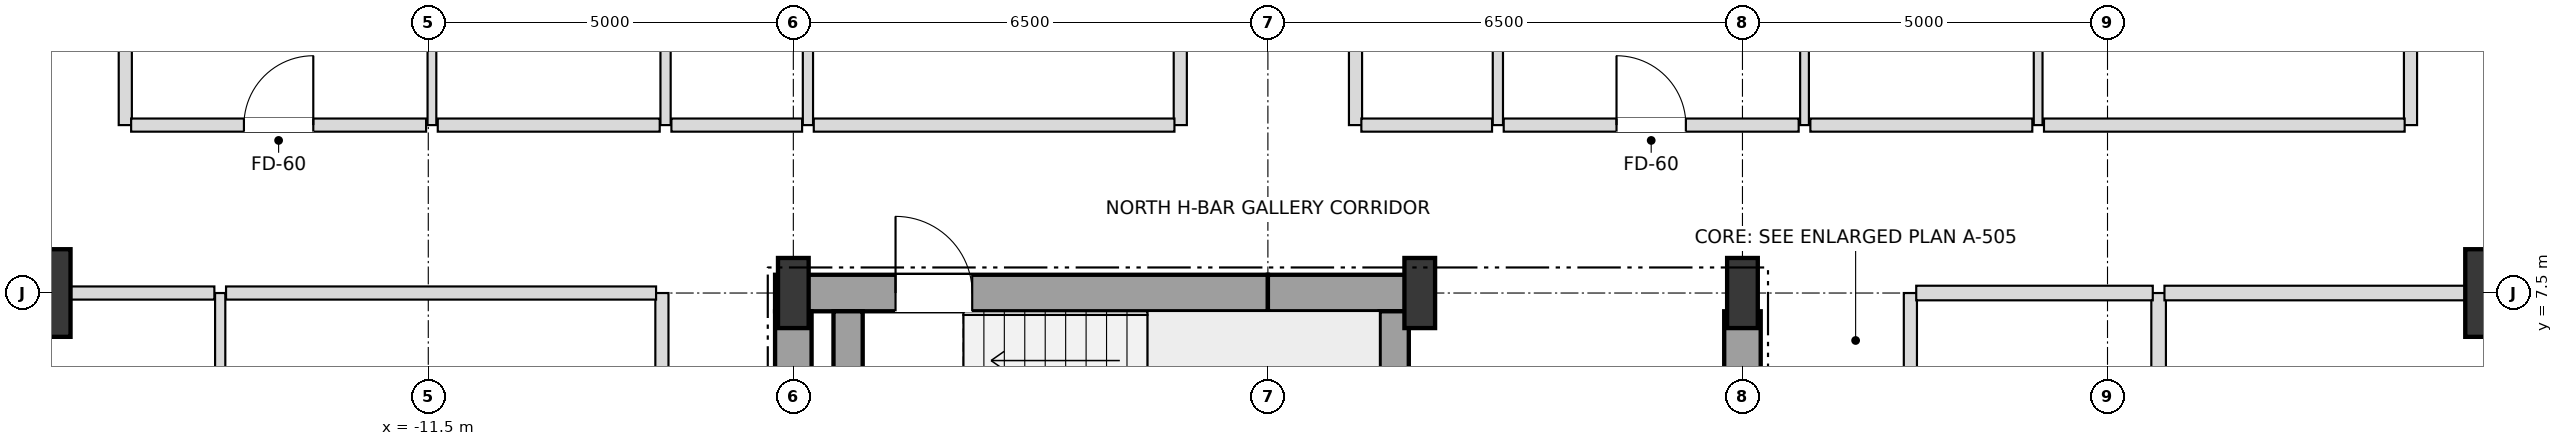
"""IFC4 building model, lengths in metres.
Left out: names, types, materials, properties, quantities, classifications, styles, units other than length and angle.
Written with IfcOpenShell. Run it as: python <this file> out.ifc"""

import sys

from ifc_helpers import new_model, si_unit, direction, frame, frame_2d, origin, origin_2d, place, context, subcontext, project, spatial, rectangle, i_section, extrude, element, fill, save


model = new_model("IFC4")
c1 = context("Model", 3, precision=1e-05, world=origin(), true_north=direction((0.0, 1.0)))
c2 = subcontext(c1, "Body", "Model", "MODEL_VIEW")
j1 = project(units=[si_unit("LENGTHUNIT", "METRE"), si_unit("PLANEANGLEUNIT", "RADIAN")], contexts=[c1])
p1 = place(None, origin())
s1 = spatial("IfcSite", under=j1, at=p1, CompositionType="ELEMENT")
p2 = place(p1, origin())
s2 = spatial("IfcBuilding", under=s1, at=p2, CompositionType="ELEMENT")
p3 = place(p2, frame((0.0, 0.0, 129.6)))
s3 = spatial("IfcBuildingStorey", under=s2, at=p3, CompositionType="ELEMENT", Elevation=129.6)
for number, where, z_axis, x_axis in (
    (1, (-6.5, 7.5, 0.0), (0.0, 0.0, 1.0), (1.0, 0.0, 0.0)),
    (2, (2.08, 7.5, 0.0), (0.0, 0.0, 1.0), (1.0, 0.0, 0.0)),
    (3, (6.5, 7.5, 0.0), (0.0, 0.0, 1.0), (1.0, 0.0, 0.0)),
):
    element("IfcColumn", number, at=place(p3, frame(where, z_axis=z_axis, x_axis=x_axis)), inside=s3, PredefinedType="COLUMN", context=c2, shape_type="SweptSolid", body=[
        extrude(i_section(OverallWidth=0.42, OverallDepth=0.96, WebThickness=0.022, FlangeThickness=0.034, at=origin_2d()), origin(), (0.0, 0.0, 1.0), 3.6),
    ])
for number, where, z_axis, x_axis in (
    (4, (17.0, 7.5, 0.0), (0.0, 0.0, 1.0), (1.0, 0.0, 0.0)),
    (5, (-17.0, 7.5, 0.0), (0.0, 0.0, 1.0), (1.0, 0.0, 0.0)),
):
    element("IfcColumn", number, at=place(p3, frame(where, z_axis=z_axis, x_axis=x_axis)), inside=s3, PredefinedType="USERDEFINED", context=c2, shape_type="SweptSolid", body=[
        extrude(rectangle(XDim=1.2, YDim=1.2, at=origin_2d()), origin(), (0.0, 0.0, 1.0), 3.6),
    ])
p4 = place(p3, frame((-6.75, 7.5, 0.0), z_axis=(0.0, 0.0, 1.0), x_axis=(1.0, 0.0, 0.0)))
e6 = element("IfcWall", 6, at=p4, inside=s3, PredefinedType="SHEAR", context=c2, shape_type="SweptSolid", body=[
    extrude(rectangle(XDim=6.75, YDim=0.5, at=frame_2d((3.375, 0.0))), origin(), (0.0, 0.0, 1.0), 3.38),
])
p5 = place(p4, frame((1.65, 0.0, 0.0)))
e7 = element("IfcOpeningElement", 7, at=p5, cuts=e6, PredefinedType="OPENING", context=c2, shape_type="SweptSolid", body=[
    extrude(rectangle(XDim=1.05, YDim=2.15, at=frame_2d((0.525, 1.075))), frame((0.0, 0.26, 0.0), z_axis=(0.0, -1.0, 0.0), x_axis=(1.0, 0.0, 0.0)), (0.0, 0.0, 1.0), 0.52),
])
p6 = place(p3, frame((0.0, 7.5, 0.0), z_axis=(0.0, 0.0, 1.0), x_axis=(1.0, 0.0, 0.0)))
e8 = element("IfcWall", 8, at=p6, inside=s3, PredefinedType="SHEAR", context=c2, shape_type="SweptSolid", body=[
    extrude(rectangle(XDim=2.08, YDim=0.5, at=frame_2d((1.04, 0.0))), origin(), (0.0, 0.0, 1.0), 3.38),
])
for number, where, z_axis, x_axis in (
    (9, (-6.5, 3.95, 0.0), (0.0, 0.0, 1.0), (0.0, 1.0, 0.0)),
    (10, (6.5, 3.95, 0.0), (0.0, 0.0, 1.0), (0.0, 1.0, 0.0)),
):
    element("IfcWall", number, at=place(p3, frame(where, z_axis=z_axis, x_axis=x_axis)), inside=s3, PredefinedType="SHEAR", context=c2, shape_type="SweptSolid", body=[
        extrude(rectangle(XDim=3.3, YDim=0.5, at=frame_2d((1.65, 0.0))), origin(), (0.0, 0.0, 1.0), 3.38),
    ])
for number, where, z_axis, x_axis in (
    (11, (1.73, 3.95, 0.0), (0.0, 0.0, 1.0), (0.0, 1.0, 0.0)),
    (12, (-5.75, 3.95, 0.0), (0.0, 0.0, 1.0), (0.0, 1.0, 0.0)),
):
    element("IfcWall", number, at=place(p3, frame(where, z_axis=z_axis, x_axis=x_axis)), inside=s3, PredefinedType="SHEAR", context=c2, shape_type="SweptSolid", body=[
        extrude(rectangle(XDim=3.3, YDim=0.4, at=frame_2d((1.65, 0.0))), origin(), (0.0, 0.0, 1.0), 3.38),
    ])
p7 = place(p3, frame((-15.65, 9.8, 0.0), z_axis=(0.0, 0.0, 1.0), x_axis=(0.0, 1.0, 0.0)))
e13 = element("IfcWall", 13, at=p7, inside=s3, PredefinedType="PARTITIONING", context=c2, shape_type="SweptSolid", body=[
    extrude(rectangle(XDim=7.35, YDim=0.18, at=frame_2d((3.675, 0.0))), origin(), (0.0, 0.0, 1.0), 2.736),
])
p8 = place(p3, frame((-14.35, -7.5, 0.0), z_axis=(0.0, 0.0, 1.0), x_axis=(0.0, 1.0, 0.0)))
e14 = element("IfcWall", 14, at=p8, inside=s3, PredefinedType="PARTITIONING", context=c2, shape_type="SweptSolid", body=[
    extrude(rectangle(XDim=15.0, YDim=0.14, at=frame_2d((7.5, 0.0))), origin(), (0.0, 0.0, 1.0), 3.38),
])
p9 = place(p8, frame((3.475, 0.0, 0.0)))
e15 = element("IfcOpeningElement", 15, at=p9, cuts=e14, PredefinedType="OPENING", context=c2, shape_type="SweptSolid", body=[
    extrude(rectangle(XDim=0.95, YDim=2.1, at=frame_2d((0.475, 1.05))), frame((0.0, 0.08, 0.0), z_axis=(0.0, -1.0, 0.0), x_axis=(1.0, 0.0, 0.0)), (0.0, 0.0, 1.0), 0.16),
])
p10 = place(p3, frame((-11.45, 9.8, 0.0), z_axis=(0.0, 0.0, 1.0), x_axis=(0.0, 1.0, 0.0)))
e16 = element("IfcWall", 16, at=p10, inside=s3, PredefinedType="PARTITIONING", context=c2, shape_type="SweptSolid", body=[
    extrude(rectangle(XDim=7.35, YDim=0.12, at=frame_2d((3.675, 0.0))), origin(), (0.0, 0.0, 1.0), 2.736),
])
p11 = place(p10, frame((3.713, 0.0, 0.0)))
e17 = element("IfcOpeningElement", 17, at=p11, cuts=e16, PredefinedType="OPENING", context=c2, shape_type="SweptSolid", body=[
    extrude(rectangle(XDim=0.95, YDim=2.1, at=frame_2d((0.475, 1.05))), frame((0.0, 0.07, 0.0), z_axis=(0.0, -1.0, 0.0), x_axis=(1.0, 0.0, 0.0)), (0.0, 0.0, 1.0), 0.14),
])
p12 = place(p3, frame((-8.3, -7.5, 0.0), z_axis=(0.0, 0.0, 1.0), x_axis=(0.0, 1.0, 0.0)))
e18 = element("IfcWall", 18, at=p12, inside=s3, PredefinedType="PARTITIONING", context=c2, shape_type="SweptSolid", body=[
    extrude(rectangle(XDim=15.0, YDim=0.18, at=frame_2d((7.5, 0.0))), origin(), (0.0, 0.0, 1.0), 3.38),
])
p13 = place(p12, frame((2.495, 0.0, 0.0)))
e19 = element("IfcOpeningElement", 19, at=p13, cuts=e18, PredefinedType="OPENING", context=c2, shape_type="SweptSolid", body=[
    extrude(rectangle(XDim=0.95, YDim=2.15, at=frame_2d((0.475, 1.075))), frame((0.0, 0.1, 0.0), z_axis=(0.0, -1.0, 0.0), x_axis=(1.0, 0.0, 0.0)), (0.0, 0.0, 1.0), 0.2),
])
p14 = place(p3, frame((-8.25, 9.8, 0.0), z_axis=(0.0, 0.0, 1.0), x_axis=(0.0, 1.0, 0.0)))
e20 = element("IfcWall", 20, at=p14, inside=s3, PredefinedType="PARTITIONING", context=c2, shape_type="SweptSolid", body=[
    extrude(rectangle(XDim=7.35, YDim=0.14, at=frame_2d((3.675, 0.0))), origin(), (0.0, 0.0, 1.0), 2.816),
])
p15 = place(p14, frame((3.22, 0.0, 0.0)))
e21 = element("IfcOpeningElement", 21, at=p15, cuts=e20, PredefinedType="OPENING", context=c2, shape_type="SweptSolid", body=[
    extrude(rectangle(XDim=0.9, YDim=2.1, at=frame_2d((0.45, 1.05))), frame((0.0, 0.08, 0.0), z_axis=(0.0, -1.0, 0.0), x_axis=(1.0, 0.0, 0.0)), (0.0, 0.0, 1.0), 0.16),
])
p16 = place(p3, frame((-6.3, 9.8, 0.0), z_axis=(0.0, 0.0, 1.0), x_axis=(0.0, 1.0, 0.0)))
e22 = element("IfcWall", 22, at=p16, inside=s3, PredefinedType="PARTITIONING", context=c2, shape_type="SweptSolid", body=[
    extrude(rectangle(XDim=13.35, YDim=0.14, at=frame_2d((6.675, 0.0))), origin(), (0.0, 0.0, 1.0), 2.816),
])
p17 = place(p16, frame((11.051, 0.0, 0.0)))
e23 = element("IfcOpeningElement", 23, at=p17, cuts=e22, PredefinedType="OPENING", context=c2, shape_type="SweptSolid", body=[
    extrude(rectangle(XDim=0.9, YDim=2.1, at=frame_2d((0.45, 1.05))), frame((0.0, 0.08, 0.0), z_axis=(0.0, -1.0, 0.0), x_axis=(1.0, 0.0, 0.0)), (0.0, 0.0, 1.0), 0.16),
])
for number, where, z_axis, x_axis in (
    (24, (-1.2, 9.8, 0.0), (0.0, 0.0, 1.0), (0.0, 1.0, 0.0)),
    (25, (1.2, 9.8, 0.0), (0.0, 0.0, 1.0), (0.0, 1.0, 0.0)),
):
    element("IfcWall", number, at=place(p3, frame(where, z_axis=z_axis, x_axis=x_axis)), inside=s3, PredefinedType="PARTITIONING", context=c2, shape_type="SweptSolid", body=[
        extrude(rectangle(XDim=13.35, YDim=0.18, at=frame_2d((6.675, 0.0))), origin(), (0.0, 0.0, 1.0), 2.816),
    ])
p18 = place(p3, frame((3.15, 9.8, 0.0), z_axis=(0.0, 0.0, 1.0), x_axis=(0.0, 1.0, 0.0)))
e26 = element("IfcWall", 26, at=p18, inside=s3, PredefinedType="PARTITIONING", context=c2, shape_type="SweptSolid", body=[
    extrude(rectangle(XDim=7.35, YDim=0.14, at=frame_2d((3.675, 0.0))), origin(), (0.0, 0.0, 1.0), 3.38),
])
p19 = place(p18, frame((3.22, 0.0, 0.0)))
e27 = element("IfcOpeningElement", 27, at=p19, cuts=e26, PredefinedType="OPENING", context=c2, shape_type="SweptSolid", body=[
    extrude(rectangle(XDim=0.9, YDim=2.1, at=frame_2d((0.45, 1.05))), frame((0.0, 0.08, 0.0), z_axis=(0.0, -1.0, 0.0), x_axis=(1.0, 0.0, 0.0)), (0.0, 0.0, 1.0), 0.16),
])
p20 = place(p3, frame((7.35, 9.8, 0.0), z_axis=(0.0, 0.0, 1.0), x_axis=(0.0, 1.0, 0.0)))
e28 = element("IfcWall", 28, at=p20, inside=s3, PredefinedType="PARTITIONING", context=c2, shape_type="SweptSolid", body=[
    extrude(rectangle(XDim=13.35, YDim=0.12, at=frame_2d((6.675, 0.0))), origin(), (0.0, 0.0, 1.0), 2.816),
])
p21 = place(p20, frame((3.195, 0.0, 0.0)))
e29 = element("IfcOpeningElement", 29, at=p21, cuts=e28, PredefinedType="OPENING", context=c2, shape_type="SweptSolid", body=[
    extrude(rectangle(XDim=0.95, YDim=2.1, at=frame_2d((0.475, 1.05))), frame((0.0, 0.07, 0.0), z_axis=(0.0, -1.0, 0.0), x_axis=(1.0, 0.0, 0.0)), (0.0, 0.0, 1.0), 0.14),
])
p22 = place(p20, frame((11.051, 0.0, 0.0)))
e30 = element("IfcOpeningElement", 30, at=p22, cuts=e28, PredefinedType="OPENING", context=c2, shape_type="SweptSolid", body=[
    extrude(rectangle(XDim=0.9, YDim=2.1, at=frame_2d((0.45, 1.05))), frame((0.0, 0.07, 0.0), z_axis=(0.0, -1.0, 0.0), x_axis=(1.0, 0.0, 0.0)), (0.0, 0.0, 1.0), 0.14),
])
p23 = place(p3, frame((8.8, -7.5, 0.0), z_axis=(0.0, 0.0, 1.0), x_axis=(0.0, 1.0, 0.0)))
e31 = element("IfcWall", 31, at=p23, inside=s3, PredefinedType="PARTITIONING", context=c2, shape_type="SweptSolid", body=[
    extrude(rectangle(XDim=15.0, YDim=0.18, at=frame_2d((7.5, 0.0))), origin(), (0.0, 0.0, 1.0), 3.38),
])
p24 = place(p23, frame((2.425, 0.0, 0.0)))
e32 = element("IfcOpeningElement", 32, at=p24, cuts=e31, PredefinedType="OPENING", context=c2, shape_type="SweptSolid", body=[
    extrude(rectangle(XDim=0.95, YDim=2.15, at=frame_2d((0.475, 1.075))), frame((0.0, 0.1, 0.0), z_axis=(0.0, -1.0, 0.0), x_axis=(1.0, 0.0, 0.0)), (0.0, 0.0, 1.0), 0.2),
])
p25 = place(p23, frame((7.525, 0.0, 0.0)))
e33 = element("IfcOpeningElement", 33, at=p25, cuts=e31, PredefinedType="OPENING", context=c2, shape_type="SweptSolid", body=[
    extrude(rectangle(XDim=0.95, YDim=2.15, at=frame_2d((0.475, 1.075))), frame((0.0, 0.1, 0.0), z_axis=(0.0, -1.0, 0.0), x_axis=(1.0, 0.0, 0.0)), (0.0, 0.0, 1.0), 0.2),
])
p26 = place(p23, frame((12.225, 0.0, 0.0)))
e34 = element("IfcOpeningElement", 34, at=p26, cuts=e31, PredefinedType="OPENING", context=c2, shape_type="SweptSolid", body=[
    extrude(rectangle(XDim=0.95, YDim=2.15, at=frame_2d((0.475, 1.075))), frame((0.0, 0.1, 0.0), z_axis=(0.0, -1.0, 0.0), x_axis=(1.0, 0.0, 0.0)), (0.0, 0.0, 1.0), 0.2),
])
p27 = place(p3, frame((10.55, 9.8, 0.0), z_axis=(0.0, 0.0, 1.0), x_axis=(0.0, 1.0, 0.0)))
e35 = element("IfcWall", 35, at=p27, inside=s3, PredefinedType="PARTITIONING", context=c2, shape_type="SweptSolid", body=[
    extrude(rectangle(XDim=13.35, YDim=0.12, at=frame_2d((6.675, 0.0))), origin(), (0.0, 0.0, 1.0), 2.816),
])
p28 = place(p27, frame((3.713, 0.0, 0.0)))
e36 = element("IfcOpeningElement", 36, at=p28, cuts=e35, PredefinedType="OPENING", context=c2, shape_type="SweptSolid", body=[
    extrude(rectangle(XDim=0.95, YDim=2.1, at=frame_2d((0.475, 1.05))), frame((0.0, 0.07, 0.0), z_axis=(0.0, -1.0, 0.0), x_axis=(1.0, 0.0, 0.0)), (0.0, 0.0, 1.0), 0.14),
])
p29 = place(p27, frame((11.051, 0.0, 0.0)))
e37 = element("IfcOpeningElement", 37, at=p29, cuts=e35, PredefinedType="OPENING", context=c2, shape_type="SweptSolid", body=[
    extrude(rectangle(XDim=0.9, YDim=2.1, at=frame_2d((0.45, 1.05))), frame((0.0, 0.07, 0.0), z_axis=(0.0, -1.0, 0.0), x_axis=(1.0, 0.0, 0.0)), (0.0, 0.0, 1.0), 0.14),
])
p30 = place(p3, frame((12.2, 3.0, 0.0), z_axis=(0.0, 0.0, 1.0), x_axis=(0.0, 1.0, 0.0)))
e38 = element("IfcWall", 38, at=p30, inside=s3, PredefinedType="SOLIDWALL", context=c2, shape_type="SweptSolid", body=[
    extrude(rectangle(XDim=4.5, YDim=0.2, at=frame_2d((2.25, 0.0))), origin(), (0.0, 0.0, 1.0), 3.38),
])
p31 = place(p3, frame((15.65, 9.8, 0.0), z_axis=(0.0, 0.0, 1.0), x_axis=(0.0, 1.0, 0.0)))
e39 = element("IfcWall", 39, at=p31, inside=s3, PredefinedType="PARTITIONING", context=c2, shape_type="SweptSolid", body=[
    extrude(rectangle(XDim=7.35, YDim=0.18, at=frame_2d((3.675, 0.0))), origin(), (0.0, 0.0, 1.0), 2.736),
])
p32 = place(p3, frame((-20.15, 7.5, 0.0), z_axis=(0.0, 0.0, 1.0), x_axis=(1.0, 0.0, 0.0)))
e40 = element("IfcWall", 40, at=p32, inside=s3, PredefinedType="PARTITIONING", context=c2, shape_type="SweptSolid", body=[
    extrude(rectangle(XDim=5.72, YDim=0.18, at=frame_2d((2.86, 0.0))), origin(), (0.0, 0.0, 1.0), 2.816),
])
p33 = place(p3, frame((-14.27, 7.5, 0.0), z_axis=(0.0, 0.0, 1.0), x_axis=(1.0, 0.0, 0.0)))
e41 = element("IfcWall", 41, at=p33, inside=s3, PredefinedType="PARTITIONING", context=c2, shape_type="SweptSolid", body=[
    extrude(rectangle(XDim=5.89, YDim=0.18, at=frame_2d((2.945, 0.0))), origin(), (0.0, 0.0, 1.0), 2.816),
])
p34 = place(p3, frame((8.88, 7.5, 0.0), z_axis=(0.0, 0.0, 1.0), x_axis=(1.0, 0.0, 0.0)))
e42 = element("IfcWall", 42, at=p34, inside=s3, PredefinedType="SOLIDWALL", context=c2, shape_type="SweptSolid", body=[
    extrude(rectangle(XDim=3.24, YDim=0.2, at=frame_2d((1.62, 0.0))), origin(), (0.0, 0.0, 1.0), 2.816),
])
p35 = place(p3, frame((12.28, 7.5, 0.0), z_axis=(0.0, 0.0, 1.0), x_axis=(1.0, 0.0, 0.0)))
e43 = element("IfcWall", 43, at=p35, inside=s3, PredefinedType="SOLIDWALL", context=c2, shape_type="SweptSolid", body=[
    extrude(rectangle(XDim=7.87, YDim=0.2, at=frame_2d((3.935, 0.0))), origin(), (0.0, 0.0, 1.0), 2.816),
])
p36 = place(p3, frame((-15.57, 9.8, 0.0), z_axis=(0.0, 0.0, 1.0), x_axis=(1.0, 0.0, 0.0)))
e44 = element("IfcWall", 44, at=p36, inside=s3, PredefinedType="PARTITIONING", context=c2, shape_type="SweptSolid", body=[
    extrude(rectangle(XDim=4.04, YDim=0.18, at=frame_2d((2.02, 0.0))), origin(), (0.0, 0.0, 1.0), 3.38),
])
p37 = place(p36, frame((1.545, 0.0, 0.0)))
e45 = element("IfcOpeningElement", 45, at=p37, cuts=e44, PredefinedType="OPENING", context=c2, shape_type="SweptSolid", body=[
    extrude(rectangle(XDim=0.95, YDim=2.15, at=frame_2d((0.475, 1.075))), frame((0.0, 0.1, 0.0), z_axis=(0.0, -1.0, 0.0), x_axis=(1.0, 0.0, 0.0)), (0.0, 0.0, 1.0), 0.2),
])
p38 = place(p3, frame((-11.37, 9.8, 0.0), z_axis=(0.0, 0.0, 1.0), x_axis=(1.0, 0.0, 0.0)))
e46 = element("IfcWall", 46, at=p38, inside=s3, PredefinedType="PARTITIONING", context=c2, shape_type="SweptSolid", body=[
    extrude(rectangle(XDim=3.04, YDim=0.18, at=frame_2d((1.52, 0.0))), origin(), (0.0, 0.0, 1.0), 3.38),
])
p39 = place(p3, frame((-8.17, 9.8, 0.0), z_axis=(0.0, 0.0, 1.0), x_axis=(1.0, 0.0, 0.0)))
e47 = element("IfcWall", 47, at=p39, inside=s3, PredefinedType="PARTITIONING", context=c2, shape_type="SweptSolid", body=[
    extrude(rectangle(XDim=1.79, YDim=0.18, at=frame_2d((0.895, 0.0))), origin(), (0.0, 0.0, 1.0), 2.816),
])
p40 = place(p3, frame((-6.22, 9.8, 0.0), z_axis=(0.0, 0.0, 1.0), x_axis=(1.0, 0.0, 0.0)))
e48 = element("IfcWall", 48, at=p40, inside=s3, PredefinedType="PARTITIONING", context=c2, shape_type="SweptSolid", body=[
    extrude(rectangle(XDim=4.94, YDim=0.18, at=frame_2d((2.47, 0.0))), origin(), (0.0, 0.0, 1.0), 3.38),
])
p41 = place(p3, frame((1.28, 9.8, 0.0), z_axis=(0.0, 0.0, 1.0), x_axis=(1.0, 0.0, 0.0)))
e49 = element("IfcWall", 49, at=p41, inside=s3, PredefinedType="PARTITIONING", context=c2, shape_type="SweptSolid", body=[
    extrude(rectangle(XDim=1.79, YDim=0.18, at=frame_2d((0.895, 0.0))), origin(), (0.0, 0.0, 1.0), 3.38),
])
p42 = place(p3, frame((3.23, 9.8, 0.0), z_axis=(0.0, 0.0, 1.0), x_axis=(1.0, 0.0, 0.0)))
e50 = element("IfcWall", 50, at=p42, inside=s3, PredefinedType="PARTITIONING", context=c2, shape_type="SweptSolid", body=[
    extrude(rectangle(XDim=4.04, YDim=0.18, at=frame_2d((2.02, 0.0))), origin(), (0.0, 0.0, 1.0), 2.816),
])
p43 = place(p42, frame((1.545, 0.0, 0.0)))
e51 = element("IfcOpeningElement", 51, at=p43, cuts=e50, PredefinedType="OPENING", context=c2, shape_type="SweptSolid", body=[
    extrude(rectangle(XDim=0.95, YDim=2.15, at=frame_2d((0.475, 1.075))), frame((0.0, 0.1, 0.0), z_axis=(0.0, -1.0, 0.0), x_axis=(1.0, 0.0, 0.0)), (0.0, 0.0, 1.0), 0.2),
])
p44 = place(p3, frame((7.43, 9.8, 0.0), z_axis=(0.0, 0.0, 1.0), x_axis=(1.0, 0.0, 0.0)))
e52 = element("IfcWall", 52, at=p44, inside=s3, PredefinedType="PARTITIONING", context=c2, shape_type="SweptSolid", body=[
    extrude(rectangle(XDim=3.04, YDim=0.18, at=frame_2d((1.52, 0.0))), origin(), (0.0, 0.0, 1.0), 3.38),
])
p45 = place(p3, frame((10.63, 9.8, 0.0), z_axis=(0.0, 0.0, 1.0), x_axis=(1.0, 0.0, 0.0)))
e53 = element("IfcWall", 53, at=p45, inside=s3, PredefinedType="PARTITIONING", context=c2, shape_type="SweptSolid", body=[
    extrude(rectangle(XDim=4.94, YDim=0.18, at=frame_2d((2.47, 0.0))), origin(), (0.0, 0.0, 1.0), 3.38),
])
p46 = place(p5, origin())
e54 = element("IfcDoor", 54, at=p46, inside=s3, OperationType="SINGLE_SWING_LEFT", PredefinedType="DOOR", context=c2, shape_type="SweptSolid", body=[
    extrude(rectangle(XDim=1.05, YDim=2.15, at=frame_2d((0.525, 1.075))), frame((0.0, 0.025, 0.0), z_axis=(0.0, -1.0, 0.0), x_axis=(1.0, 0.0, 0.0)), (0.0, 0.0, 1.0), 0.05),
])
fill(e7, e54)
p47 = place(p37, origin())
e55 = element("IfcDoor", 55, at=p47, inside=s3, OperationType="SINGLE_SWING_RIGHT", PredefinedType="DOOR", context=c2, shape_type="SweptSolid", body=[
    extrude(rectangle(XDim=0.95, YDim=2.15, at=frame_2d((0.475, 1.075))), frame((0.0, 0.025, 0.0), z_axis=(0.0, -1.0, 0.0), x_axis=(1.0, 0.0, 0.0)), (0.0, 0.0, 1.0), 0.05),
])
fill(e45, e55)
p48 = place(p43, origin())
e56 = element("IfcDoor", 56, at=p48, inside=s3, OperationType="SINGLE_SWING_LEFT", PredefinedType="DOOR", context=c2, shape_type="SweptSolid", body=[
    extrude(rectangle(XDim=0.95, YDim=2.15, at=frame_2d((0.475, 1.075))), frame((0.0, 0.025, 0.0), z_axis=(0.0, -1.0, 0.0), x_axis=(1.0, 0.0, 0.0)), (0.0, 0.0, 1.0), 0.05),
])
fill(e51, e56)
save(model, sys.argv[1])
